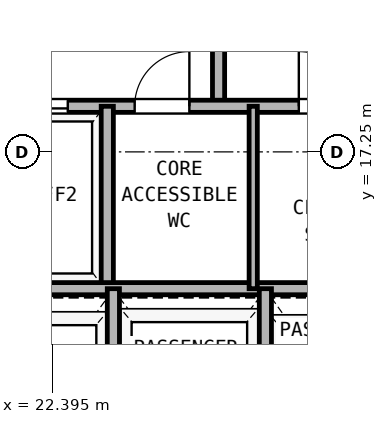
"""IFC4 building model, lengths in metres.
Left out: names, types, materials, properties, quantities, classifications, styles, units other than length and angle.
Written with IfcOpenShell. Run it as: python <this file> out.ifc"""

import sys

from ifc_helpers import new_model, si_unit, direction, frame, frame_2d, origin, place, context, subcontext, project, spatial, rectangle, extrude, element, fill, save


model = new_model("IFC4")
c1 = context("Model", 3, precision=1e-05, world=origin(), true_north=direction((0.0, 1.0)))
c2 = subcontext(c1, "Body", "Model", "MODEL_VIEW")
j1 = project(units=[si_unit("LENGTHUNIT", "METRE"), si_unit("PLANEANGLEUNIT", "RADIAN")], contexts=[c1])
p1 = place(None, origin())
s1 = spatial("IfcSite", under=j1, at=p1, CompositionType="ELEMENT")
p2 = place(p1, origin())
s2 = spatial("IfcBuilding", under=s1, at=p2, CompositionType="ELEMENT")
p3 = place(p2, frame((0.0, 0.0, 58.5)))
s3 = spatial("IfcBuildingStorey", under=s2, at=p3, CompositionType="ELEMENT", Elevation=58.5)
p4 = place(p3, frame((25.13, 18.0, 0.0), z_axis=(0.0, 0.0, 1.0), x_axis=(0.0, 1.0, 0.0)))
e1 = element("IfcWall", 1, at=p4, inside=s3, PredefinedType="PARTITIONING", context=c2, shape_type="SweptSolid", body=[
    extrude(rectangle(XDim=3.39, YDim=0.2, at=frame_2d((1.695, 0.0))), origin(), (0.0, 0.0, 1.0), 3.32),
])
p5 = place(p4, frame((1.1, 0.0, 0.0)))
e2 = element("IfcOpeningElement", 2, at=p5, cuts=e1, PredefinedType="OPENING", context=c2, shape_type="SweptSolid", body=[
    extrude(rectangle(XDim=1.15, YDim=2.2, at=frame_2d((0.575, 1.1))), frame((0.0, 0.11, 0.0), z_axis=(0.0, -1.0, 0.0), x_axis=(1.0, 0.0, 0.0)), (0.0, 0.0, 1.0), 0.22),
])
p6 = place(p3, frame((18.835, 18.0, 0.0), z_axis=(0.0, 0.0, 1.0), x_axis=(1.0, 0.0, 0.0)))
e3 = element("IfcWall", 3, at=p6, inside=s3, PredefinedType="PARTITIONING", context=c2, shape_type="SweptSolid", body=[
    extrude(rectangle(XDim=9.33, YDim=0.2, at=frame_2d((4.665, 0.0))), origin(), (0.0, 0.0, 1.0), 3.32),
])
p7 = place(p6, frame((0.415, 0.0, 0.0)))
e4 = element("IfcOpeningElement", 4, at=p7, cuts=e3, PredefinedType="OPENING", context=c2, shape_type="SweptSolid", body=[
    extrude(rectangle(XDim=1.3, YDim=2.3, at=frame_2d((0.65, 1.15))), frame((0.0, 0.11, 0.0), z_axis=(0.0, -1.0, 0.0), x_axis=(1.0, 0.0, 0.0)), (0.0, 0.0, 1.0), 0.22),
])
p8 = place(p6, frame((2.515, 0.0, 0.0)))
e5 = element("IfcOpeningElement", 5, at=p8, cuts=e3, PredefinedType="OPENING", context=c2, shape_type="SweptSolid", body=[
    extrude(rectangle(XDim=1.3, YDim=2.3, at=frame_2d((0.65, 1.15))), frame((0.0, 0.11, 0.0), z_axis=(0.0, -1.0, 0.0), x_axis=(1.0, 0.0, 0.0)), (0.0, 0.0, 1.0), 0.22),
])
p9 = place(p6, frame((4.915, 0.0, 0.0)))
e6 = element("IfcOpeningElement", 6, at=p9, cuts=e3, PredefinedType="OPENING", context=c2, shape_type="SweptSolid", body=[
    extrude(rectangle(XDim=0.9, YDim=2.05, at=frame_2d((0.45, 1.025))), frame((0.0, 0.11, 0.0), z_axis=(0.0, -1.0, 0.0), x_axis=(1.0, 0.0, 0.0)), (0.0, 0.0, 1.0), 0.22),
])
p10 = place(p6, frame((7.615, 0.0, 0.0)))
e7 = element("IfcOpeningElement", 7, at=p10, cuts=e3, PredefinedType="OPENING", context=c2, shape_type="SweptSolid", body=[
    extrude(rectangle(XDim=0.9, YDim=2.05, at=frame_2d((0.45, 1.025))), frame((0.0, 0.11, 0.0), z_axis=(0.0, -1.0, 0.0), x_axis=(1.0, 0.0, 0.0)), (0.0, 0.0, 1.0), 0.22),
])
p11 = place(p3, frame((23.3, 15.0, 0.0), z_axis=(0.0, 0.0, 1.0), x_axis=(0.0, 1.0, 0.0)))
e8 = element("IfcWall", 8, at=p11, inside=s3, PredefinedType="PARTITIONING", context=c2, shape_type="SweptSolid", body=[
    extrude(rectangle(XDim=3.0, YDim=0.2, at=frame_2d((1.5, 0.0))), origin(), (0.0, 0.0, 1.0), 3.32),
])
p12 = place(p3, frame((18.835, 15.0, 0.0), z_axis=(0.0, 0.0, 1.0), x_axis=(1.0, 0.0, 0.0)))
e9 = element("IfcWall", 9, at=p12, inside=s3, PredefinedType="PARTITIONING", context=c2, shape_type="SweptSolid", body=[
    extrude(rectangle(XDim=9.33, YDim=0.2, at=frame_2d((4.665, 0.0))), origin(), (0.0, 0.0, 1.0), 3.32),
])
p13 = place(p3, frame((25.7, 15.0, 0.0), z_axis=(0.0, 0.0, 1.0), x_axis=(0.0, 1.0, 0.0)))
e10 = element("IfcWall", 10, at=p13, inside=s3, PredefinedType="PARTITIONING", context=c2, shape_type="SweptSolid", body=[
    extrude(rectangle(XDim=3.0, YDim=0.135, at=frame_2d((1.5, 0.0))), origin(), (0.0, 0.0, 1.0), 3.32),
])
for number, where, z_axis, x_axis in (
    (11, (23.4, 11.835, 0.0), (0.0, 0.0, 1.0), (0.0, 1.0, 0.0)),
    (12, (25.9, 11.835, 0.0), (0.0, 0.0, 1.0), (0.0, 1.0, 0.0)),
):
    element("IfcWall", number, at=place(p3, frame(where, z_axis=z_axis, x_axis=x_axis)), inside=s3, PredefinedType="PARTITIONING", context=c2, shape_type="SweptSolid", body=[
        extrude(rectangle(XDim=3.165, YDim=0.2, at=frame_2d((1.583, 0.0))), origin(), (0.0, 0.0, 1.0), 3.32),
    ])
p14 = place(p8, origin())
e13 = element("IfcDoor", 13, at=p14, inside=s3, OperationType="DOUBLE_DOOR_SLIDING", PredefinedType="DOOR", context=c2, shape_type="SweptSolid", body=[
    extrude(rectangle(XDim=1.3, YDim=2.3, at=frame_2d((0.65, 1.15))), frame((0.0, 0.025, 0.0), z_axis=(0.0, -1.0, 0.0), x_axis=(1.0, 0.0, 0.0)), (0.0, 0.0, 1.0), 0.05),
])
fill(e5, e13)
p15 = place(p9, frame((0.9, 0.0, 0.0), z_axis=(0.0, 0.0, 1.0), x_axis=(-1.0, 0.0, 0.0)))
e14 = element("IfcDoor", 14, at=p15, inside=s3, OperationType="SINGLE_SWING_RIGHT", PredefinedType="DOOR", context=c2, shape_type="SweptSolid", body=[
    extrude(rectangle(XDim=0.9, YDim=2.05, at=frame_2d((0.45, 1.025))), frame((0.0, 0.025, 0.0), z_axis=(0.0, -1.0, 0.0), x_axis=(1.0, 0.0, 0.0)), (0.0, 0.0, 1.0), 0.05),
])
fill(e6, e14)
p16 = place(p10, frame((0.9, 0.0, 0.0), z_axis=(0.0, 0.0, 1.0), x_axis=(-1.0, 0.0, 0.0)))
e15 = element("IfcDoor", 15, at=p16, inside=s3, OperationType="SINGLE_SWING_LEFT", PredefinedType="DOOR", context=c2, shape_type="SweptSolid", body=[
    extrude(rectangle(XDim=0.9, YDim=2.05, at=frame_2d((0.45, 1.025))), frame((0.0, 0.025, 0.0), z_axis=(0.0, -1.0, 0.0), x_axis=(1.0, 0.0, 0.0)), (0.0, 0.0, 1.0), 0.05),
])
fill(e7, e15)
save(model, sys.argv[1])
